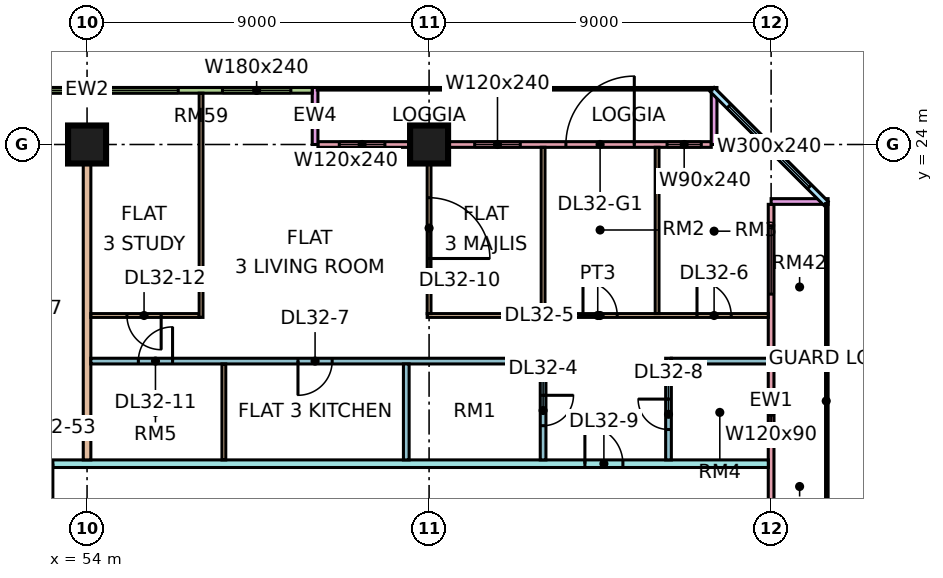
"""IFC4 building model, lengths in metres.
Left out: names, types, materials, properties, quantities, classifications, styles, units other than length and angle.
Written with IfcOpenShell. Run it as: python <this file> out.ifc"""

import sys

from ifc_helpers import new_model, si_unit, direction, frame, frame_2d, origin, origin_2d, place, context, subcontext, project, spatial, rectangle, extrude, element, fill, save


model = new_model("IFC4")
c1 = context("Model", 3, precision=1e-05, world=origin(), true_north=direction((0.0, 1.0)))
c2 = subcontext(c1, "Body", "Model", "MODEL_VIEW")
j1 = project(units=[si_unit("LENGTHUNIT", "METRE"), si_unit("PLANEANGLEUNIT", "RADIAN")], contexts=[c1])
p1 = place(None, origin())
s1 = spatial("IfcSite", under=j1, at=p1, CompositionType="ELEMENT")
p2 = place(p1, origin())
s2 = spatial("IfcBuilding", under=s1, at=p2, CompositionType="ELEMENT")
p3 = place(p2, frame((0.0, 0.0, 136.9)))
s3 = spatial("IfcBuildingStorey", under=s2, at=p3, CompositionType="ELEMENT", Elevation=136.9)
for number, where, z_axis, x_axis in (
    (1, (54.0, 24.0, 0.0), (0.0, 0.0, 1.0), (1.0, 0.0, 0.0)),
    (2, (63.0, 24.0, 0.0), (0.0, 0.0, 1.0), (1.0, 0.0, 0.0)),
):
    element("IfcColumn", number, at=place(p3, frame(where, z_axis=z_axis, x_axis=x_axis)), inside=s3, PredefinedType="COLUMN", context=c2, shape_type="SweptSolid", body=[
        extrude(rectangle(XDim=1.0, YDim=1.0, at=origin_2d()), origin(), (0.0, 0.0, 1.0), 3.75),
    ])
p4 = place(p3, frame((70.425, 24.0, 0.0), z_axis=(0.0, 0.0, 1.0), x_axis=(-1.0, 0.0, 0.0)))
e3 = element("IfcWall", 3, at=p4, inside=s3, PredefinedType="SOLIDWALL", context=c2, shape_type="SweptSolid", body=[
    extrude(rectangle(XDim=10.35, YDim=0.15, at=frame_2d((5.175, 0.0))), origin(), (0.0, 0.0, 1.0), 3.3),
])
p5 = place(p4, frame((0.262, 0.0, 0.45)))
e4 = element("IfcOpeningElement", 4, at=p5, cuts=e3, PredefinedType="OPENING", context=c2, shape_type="SweptSolid", body=[
    extrude(rectangle(XDim=0.9, YDim=2.4, at=frame_2d((0.45, 1.2))), frame((0.0, 0.085, 0.0), z_axis=(0.0, -1.0, 0.0), x_axis=(1.0, 0.0, 0.0)), (0.0, 0.0, 1.0), 0.17),
])
p6 = place(p4, frame((2.025, 0.0, 0.0)))
e5 = element("IfcOpeningElement", 5, at=p6, cuts=e3, PredefinedType="OPENING", context=c2, shape_type="SweptSolid", body=[
    extrude(rectangle(XDim=1.8, YDim=2.4, at=frame_2d((0.9, 1.2))), frame((0.0, 0.085, 0.0), z_axis=(0.0, -1.0, 0.0), x_axis=(1.0, 0.0, 0.0)), (0.0, 0.0, 1.0), 0.17),
])
p7 = place(p4, frame((5.025, 0.0, 0.45)))
e6 = element("IfcOpeningElement", 6, at=p7, cuts=e3, PredefinedType="OPENING", context=c2, shape_type="SweptSolid", body=[
    extrude(rectangle(XDim=1.2, YDim=2.4, at=frame_2d((0.6, 1.2))), frame((0.0, 0.085, 0.0), z_axis=(0.0, -1.0, 0.0), x_axis=(1.0, 0.0, 0.0)), (0.0, 0.0, 1.0), 0.17),
])
p8 = place(p4, frame((8.587, 0.0, 0.45)))
e7 = element("IfcOpeningElement", 7, at=p8, cuts=e3, PredefinedType="OPENING", context=c2, shape_type="SweptSolid", body=[
    extrude(rectangle(XDim=1.2, YDim=2.4, at=frame_2d((0.6, 1.2))), frame((0.0, 0.085, 0.0), z_axis=(0.0, -1.0, 0.0), x_axis=(1.0, 0.0, 0.0)), (0.0, 0.0, 1.0), 0.17),
])
for number, where, z_axis, x_axis in (
    (8, (70.5, 25.5, 0.0), (0.0, 0.0, 1.0), (0.0, -1.0, 0.0)),
    (9, (60.0, 25.5, 0.0), (0.0, 0.0, 1.0), (0.0, -1.0, 0.0)),
):
    element("IfcWall", number, at=place(p3, frame(where, z_axis=z_axis, x_axis=x_axis)), inside=s3, PredefinedType="SOLIDWALL", context=c2, shape_type="SweptSolid", body=[
        extrude(rectangle(XDim=1.5, YDim=0.15, at=frame_2d((0.75, 0.0))), origin(), (0.0, 0.0, 1.0), 3.3),
    ])
p9 = place(p3, frame((59.925, 25.425, 0.0), z_axis=(0.0, 0.0, 1.0), x_axis=(-1.0, 0.0, 0.0)))
e10 = element("IfcWall", 10, at=p9, inside=s3, PredefinedType="SOLIDWALL", context=c2, shape_type="SweptSolid", body=[
    extrude(rectangle(XDim=11.85, YDim=0.15, at=frame_2d((5.925, 0.0))), origin(), (0.0, 0.0, 1.0), 3.3),
])
p10 = place(p9, frame((0.562, 0.0, 0.45)))
e11 = element("IfcOpeningElement", 11, at=p10, cuts=e10, PredefinedType="OPENING", context=c2, shape_type="SweptSolid", body=[
    extrude(rectangle(XDim=1.8, YDim=2.4, at=frame_2d((0.9, 1.2))), frame((0.0, 0.085, 0.0), z_axis=(0.0, -1.0, 0.0), x_axis=(1.0, 0.0, 0.0)), (0.0, 0.0, 1.0), 0.17),
])
p11 = place(p9, frame((3.525, 0.0, 0.45)))
e12 = element("IfcOpeningElement", 12, at=p11, cuts=e10, PredefinedType="OPENING", context=c2, shape_type="SweptSolid", body=[
    extrude(rectangle(XDim=1.8, YDim=2.4, at=frame_2d((0.9, 1.2))), frame((0.0, 0.085, 0.0), z_axis=(0.0, -1.0, 0.0), x_axis=(1.0, 0.0, 0.0)), (0.0, 0.0, 1.0), 0.17),
])
p12 = place(p9, frame((6.488, 0.0, 0.45)))
e13 = element("IfcOpeningElement", 13, at=p12, cuts=e10, PredefinedType="OPENING", context=c2, shape_type="SweptSolid", body=[
    extrude(rectangle(XDim=4.8, YDim=2.4, at=frame_2d((2.4, 1.2))), frame((0.0, 0.085, 0.0), z_axis=(0.0, -1.0, 0.0), x_axis=(1.0, 0.0, 0.0)), (0.0, 0.0, 1.0), 0.17),
])
p13 = place(p3, frame((72.0, 12.075, 0.0), z_axis=(0.0, 0.0, 1.0), x_axis=(0.0, 1.0, 0.0)))
e14 = element("IfcWall", 14, at=p13, inside=s3, PredefinedType="SOLIDWALL", context=c2, shape_type="SweptSolid", body=[
    extrude(rectangle(XDim=10.35, YDim=0.15, at=frame_2d((5.175, 0.0))), origin(), (0.0, 0.0, 1.0), 3.3),
])
p14 = place(p13, frame((4.275, 0.0, 1.7)))
e15 = element("IfcOpeningElement", 15, at=p14, cuts=e14, PredefinedType="OPENING", context=c2, shape_type="SweptSolid", body=[
    extrude(rectangle(XDim=1.2, YDim=0.9, at=frame_2d((0.6, 0.45))), frame((0.0, 0.085, 0.0), z_axis=(0.0, -1.0, 0.0), x_axis=(1.0, 0.0, 0.0)), (0.0, 0.0, 1.0), 0.17),
])
p15 = place(p13, frame((7.988, 0.0, 0.45)))
e16 = element("IfcOpeningElement", 16, at=p15, cuts=e14, PredefinedType="OPENING", context=c2, shape_type="SweptSolid", body=[
    extrude(rectangle(XDim=1.8, YDim=2.4, at=frame_2d((0.9, 1.2))), frame((0.0, 0.085, 0.0), z_axis=(0.0, -1.0, 0.0), x_axis=(1.0, 0.0, 0.0)), (0.0, 0.0, 1.0), 0.17),
])
p16 = place(p3, frame((73.5, 22.5, 0.0), z_axis=(0.0, 0.0, 1.0), x_axis=(-1.0, 0.0, 0.0)))
e17 = element("IfcWall", 17, at=p16, inside=s3, PredefinedType="SOLIDWALL", context=c2, shape_type="SweptSolid", body=[
    extrude(rectangle(XDim=1.5, YDim=0.15, at=frame_2d((0.75, 0.0))), origin(), (0.0, 0.0, 1.0), 3.3),
])
p17 = place(p3, frame((73.447, 22.447, 0.0), z_axis=(0.0, 0.0, 1.0), x_axis=(-0.707106781187, 0.707106781187, 0.0)))
e18 = element("IfcWall", 18, at=p17, inside=s3, PredefinedType="SOLIDWALL", context=c2, shape_type="SweptSolid", body=[
    extrude(rectangle(XDim=4.243, YDim=0.15, at=frame_2d((2.121, 0.0))), origin(), (0.0, 0.0, 1.0), 3.3),
])
p18 = place(p17, frame((0.621, 0.0, 0.45)))
e19 = element("IfcOpeningElement", 19, at=p18, cuts=e18, PredefinedType="OPENING", context=c2, shape_type="SweptSolid", body=[
    extrude(rectangle(XDim=3.0, YDim=2.4, at=frame_2d((1.5, 1.2))), frame((0.0, 0.085, 0.0), z_axis=(0.0, -1.0, 0.0), x_axis=(1.0, 0.0, 0.0)), (0.0, 0.0, 1.0), 0.17),
])
p19 = place(p3, frame((51.225, 15.6, 0.0), z_axis=(0.0, 0.0, 1.0), x_axis=(1.0, 0.0, 0.0)))
e20 = element("IfcWall", 20, at=p19, inside=s3, PredefinedType="PARTITIONING", context=c2, shape_type="SweptSolid", body=[
    extrude(rectangle(XDim=20.701, YDim=0.2, at=frame_2d((10.351, 0.0))), origin(), (0.0, 0.0, 1.0), 3.3),
])
p20 = place(p19, frame((15.875, 0.0, 0.0)))
e21 = element("IfcOpeningElement", 21, at=p20, cuts=e20, PredefinedType="OPENING", context=c2, shape_type="SweptSolid", body=[
    extrude(rectangle(XDim=1.0, YDim=2.1, at=frame_2d((0.5, 1.05))), frame((0.0, 0.11, 0.0), z_axis=(0.0, -1.0, 0.0), x_axis=(1.0, 0.0, 0.0)), (0.0, 0.0, 1.0), 0.22),
])
p21 = place(p19, frame((0.875, 0.0, 0.0)))
e22 = element("IfcOpeningElement", 22, at=p21, cuts=e20, PredefinedType="OPENING", context=c2, shape_type="SweptSolid", body=[
    extrude(rectangle(XDim=1.0, YDim=2.1, at=frame_2d((0.5, 1.05))), frame((0.0, 0.11, 0.0), z_axis=(0.0, -1.0, 0.0), x_axis=(1.0, 0.0, 0.0)), (0.0, 0.0, 1.0), 0.22),
])
p22 = place(p3, frame((54.0, 15.7, 0.0), z_axis=(0.0, 0.0, 1.0), x_axis=(0.0, 1.0, 0.0)))
e23 = element("IfcWall", 23, at=p22, inside=s3, PredefinedType="PARTITIONING", context=c2, shape_type="SweptSolid", body=[
    extrude(rectangle(XDim=8.3, YDim=0.2, at=frame_2d((4.15, 0.0))), origin(), (0.0, 0.0, 1.0), 3.3),
])
p23 = place(p3, frame((54.1, 18.3, 0.0), z_axis=(0.0, 0.0, 1.0), x_axis=(1.0, 0.0, 0.0)))
e24 = element("IfcWall", 24, at=p23, inside=s3, PredefinedType="PARTITIONING", context=c2, shape_type="SweptSolid", body=[
    extrude(rectangle(XDim=11.975, YDim=0.15, at=frame_2d((5.987, 0.0))), origin(), (0.0, 0.0, 1.0), 3.3),
])
p24 = place(p23, frame((5.45, 0.0, 0.0)))
e25 = element("IfcOpeningElement", 25, at=p24, cuts=e24, PredefinedType="OPENING", context=c2, shape_type="SweptSolid", body=[
    extrude(rectangle(XDim=0.9, YDim=2.1, at=frame_2d((0.45, 1.05))), frame((0.0, 0.085, 0.0), z_axis=(0.0, -1.0, 0.0), x_axis=(1.0, 0.0, 0.0)), (0.0, 0.0, 1.0), 0.17),
])
p25 = place(p23, frame((1.25, 0.0, 0.0)))
e26 = element("IfcOpeningElement", 26, at=p25, cuts=e24, PredefinedType="OPENING", context=c2, shape_type="SweptSolid", body=[
    extrude(rectangle(XDim=0.9, YDim=2.1, at=frame_2d((0.45, 1.05))), frame((0.0, 0.085, 0.0), z_axis=(0.0, -1.0, 0.0), x_axis=(1.0, 0.0, 0.0)), (0.0, 0.0, 1.0), 0.17),
])
p26 = place(p3, frame((54.1, 19.5, 0.0), z_axis=(0.0, 0.0, 1.0), x_axis=(1.0, 0.0, 0.0)))
e27 = element("IfcWall", 27, at=p26, inside=s3, PredefinedType="PARTITIONING", context=c2, shape_type="SweptSolid", body=[
    extrude(rectangle(XDim=2.85, YDim=0.1, at=frame_2d((1.425, 0.0))), origin(), (0.0, 0.0, 1.0), 3.3),
])
p27 = place(p26, frame((0.95, 0.0, 0.0)))
e28 = element("IfcOpeningElement", 28, at=p27, cuts=e27, PredefinedType="OPENING", context=c2, shape_type="SweptSolid", body=[
    extrude(rectangle(XDim=0.9, YDim=2.1, at=frame_2d((0.45, 1.05))), frame((0.0, 0.06, 0.0), z_axis=(0.0, -1.0, 0.0), x_axis=(1.0, 0.0, 0.0)), (0.0, 0.0, 1.0), 0.12),
])
p28 = place(p3, frame((57.0, 19.45, 0.0), z_axis=(0.0, 0.0, 1.0), x_axis=(0.0, 1.0, 0.0)))
e29 = element("IfcWall", 29, at=p28, inside=s3, PredefinedType="PARTITIONING", context=c2, shape_type="SweptSolid", body=[
    extrude(rectangle(XDim=5.9, YDim=0.1, at=frame_2d((2.95, 0.0))), origin(), (0.0, 0.0, 1.0), 3.3),
])
p29 = place(p3, frame((57.6, 15.7, 0.0), z_axis=(0.0, 0.0, 1.0), x_axis=(0.0, 1.0, 0.0)))
e30 = element("IfcWall", 30, at=p29, inside=s3, PredefinedType="PARTITIONING", context=c2, shape_type="SweptSolid", body=[
    extrude(rectangle(XDim=2.525, YDim=0.1, at=frame_2d((1.263, 0.0))), origin(), (0.0, 0.0, 1.0), 3.3),
])
p30 = place(p3, frame((62.4, 15.7, 0.0), z_axis=(0.0, 0.0, 1.0), x_axis=(0.0, 1.0, 0.0)))
e31 = element("IfcWall", 31, at=p30, inside=s3, PredefinedType="PARTITIONING", context=c2, shape_type="SweptSolid", body=[
    extrude(rectangle(XDim=2.525, YDim=0.15, at=frame_2d((1.263, 0.0))), origin(), (0.0, 0.0, 1.0), 3.3),
])
p31 = place(p3, frame((62.95, 19.5, 0.0), z_axis=(0.0, 0.0, 1.0), x_axis=(1.0, 0.0, 0.0)))
e32 = element("IfcWall", 32, at=p31, inside=s3, PredefinedType="PARTITIONING", context=c2, shape_type="SweptSolid", body=[
    extrude(rectangle(XDim=8.976, YDim=0.1, at=frame_2d((4.488, 0.0))), origin(), (0.0, 0.0, 1.0), 3.3),
])
p32 = place(p31, frame((4.1, 0.0, 0.0)))
e33 = element("IfcOpeningElement", 33, at=p32, cuts=e32, PredefinedType="OPENING", context=c2, shape_type="SweptSolid", body=[
    extrude(rectangle(XDim=0.9, YDim=2.1, at=frame_2d((0.45, 1.05))), frame((0.0, 0.06, 0.0), z_axis=(0.0, -1.0, 0.0), x_axis=(1.0, 0.0, 0.0)), (0.0, 0.0, 1.0), 0.12),
])
p33 = place(p31, frame((7.1, 0.0, 0.0)))
e34 = element("IfcOpeningElement", 34, at=p33, cuts=e32, PredefinedType="OPENING", context=c2, shape_type="SweptSolid", body=[
    extrude(rectangle(XDim=0.9, YDim=2.1, at=frame_2d((0.45, 1.05))), frame((0.0, 0.06, 0.0), z_axis=(0.0, -1.0, 0.0), x_axis=(1.0, 0.0, 0.0)), (0.0, 0.0, 1.0), 0.12),
])
p34 = place(p3, frame((63.0, 19.55, 0.0), z_axis=(0.0, 0.0, 1.0), x_axis=(0.0, 1.0, 0.0)))
e35 = element("IfcWall", 35, at=p34, inside=s3, PredefinedType="PARTITIONING", context=c2, shape_type="SweptSolid", body=[
    extrude(rectangle(XDim=4.376, YDim=0.1, at=frame_2d((2.188, 0.0))), origin(), (0.0, 0.0, 1.0), 3.3),
])
p35 = place(p34, frame((1.45, 0.0, 0.0)))
e36 = element("IfcOpeningElement", 36, at=p35, cuts=e35, PredefinedType="OPENING", context=c2, shape_type="SweptSolid", body=[
    extrude(rectangle(XDim=1.6, YDim=2.1, at=frame_2d((0.8, 1.05))), frame((0.0, 0.06, 0.0), z_axis=(0.0, -1.0, 0.0), x_axis=(1.0, 0.0, 0.0)), (0.0, 0.0, 1.0), 0.12),
])
p36 = place(p3, frame((66.0, 15.7, 0.0), z_axis=(0.0, 0.0, 1.0), x_axis=(0.0, 1.0, 0.0)))
e37 = element("IfcWall", 37, at=p36, inside=s3, PredefinedType="PARTITIONING", context=c2, shape_type="SweptSolid", body=[
    extrude(rectangle(XDim=2.525, YDim=0.15, at=frame_2d((1.263, 0.0))), origin(), (0.0, 0.0, 1.0), 3.3),
])
p37 = place(p36, frame((0.9, 0.0, 0.0)))
e38 = element("IfcOpeningElement", 38, at=p37, cuts=e37, PredefinedType="OPENING", context=c2, shape_type="SweptSolid", body=[
    extrude(rectangle(XDim=0.8, YDim=2.1, at=frame_2d((0.4, 1.05))), frame((0.0, 0.085, 0.0), z_axis=(0.0, -1.0, 0.0), x_axis=(1.0, 0.0, 0.0)), (0.0, 0.0, 1.0), 0.17),
])
for number, where, z_axis, x_axis in (
    (39, (66.0, 19.55, 0.0), (0.0, 0.0, 1.0), (0.0, 1.0, 0.0)),
    (40, (69.0, 19.55, 0.0), (0.0, 0.0, 1.0), (0.0, 1.0, 0.0)),
):
    element("IfcWall", number, at=place(p3, frame(where, z_axis=z_axis, x_axis=x_axis)), inside=s3, PredefinedType="PARTITIONING", context=c2, shape_type="SweptSolid", body=[
        extrude(rectangle(XDim=4.376, YDim=0.1, at=frame_2d((2.188, 0.0))), origin(), (0.0, 0.0, 1.0), 3.3),
    ])
p38 = place(p3, frame((69.3, 15.7, 0.0), z_axis=(0.0, 0.0, 1.0), x_axis=(0.0, 1.0, 0.0)))
e41 = element("IfcWall", 41, at=p38, inside=s3, PredefinedType="PARTITIONING", context=c2, shape_type="SweptSolid", body=[
    extrude(rectangle(XDim=2.675, YDim=0.15, at=frame_2d((1.337, 0.0))), origin(), (0.0, 0.0, 1.0), 3.3),
])
p39 = place(p38, frame((0.8, 0.0, 0.0)))
e42 = element("IfcOpeningElement", 42, at=p39, cuts=e41, PredefinedType="OPENING", context=c2, shape_type="SweptSolid", body=[
    extrude(rectangle(XDim=0.8, YDim=2.1, at=frame_2d((0.4, 1.05))), frame((0.0, 0.085, 0.0), z_axis=(0.0, -1.0, 0.0), x_axis=(1.0, 0.0, 0.0)), (0.0, 0.0, 1.0), 0.17),
])
p40 = place(p3, frame((69.375, 18.3, 0.0), z_axis=(0.0, 0.0, 1.0), x_axis=(1.0, 0.0, 0.0)))
e43 = element("IfcWall", 43, at=p40, inside=s3, PredefinedType="PARTITIONING", context=c2, shape_type="SweptSolid", body=[
    extrude(rectangle(XDim=2.551, YDim=0.15, at=frame_2d((1.275, 0.0))), origin(), (0.0, 0.0, 1.0), 3.3),
])
p41 = place(p5, origin())
e44 = element("IfcWindow", 44, at=p41, inside=s3, PartitioningType="SINGLE_PANEL", PredefinedType="WINDOW", context=c2, shape_type="SweptSolid", body=[
    extrude(rectangle(XDim=0.9, YDim=2.4, at=frame_2d((0.45, 1.2))), frame((0.0, 0.03, 0.0), z_axis=(0.0, -1.0, 0.0), x_axis=(1.0, 0.0, 0.0)), (0.0, 0.0, 1.0), 0.06),
])
fill(e4, e44)
p42 = place(p6, frame((1.8, 0.0, 0.0), z_axis=(0.0, 0.0, 1.0), x_axis=(-1.0, 0.0, 0.0)))
e45 = element("IfcDoor", 45, at=p42, inside=s3, OperationType="DOUBLE_DOOR_SINGLE_SWING", PredefinedType="DOOR", context=c2, shape_type="SweptSolid", body=[
    extrude(rectangle(XDim=1.8, YDim=2.4, at=frame_2d((0.9, 1.2))), frame((0.0, 0.025, 0.0), z_axis=(0.0, -1.0, 0.0), x_axis=(1.0, 0.0, 0.0)), (0.0, 0.0, 1.0), 0.05),
])
fill(e5, e45)
p43 = place(p7, origin())
e46 = element("IfcWindow", 46, at=p43, inside=s3, PartitioningType="SINGLE_PANEL", PredefinedType="WINDOW", context=c2, shape_type="SweptSolid", body=[
    extrude(rectangle(XDim=1.2, YDim=2.4, at=frame_2d((0.6, 1.2))), frame((0.0, 0.03, 0.0), z_axis=(0.0, -1.0, 0.0), x_axis=(1.0, 0.0, 0.0)), (0.0, 0.0, 1.0), 0.06),
])
fill(e6, e46)
p44 = place(p8, origin())
e47 = element("IfcWindow", 47, at=p44, inside=s3, PartitioningType="SINGLE_PANEL", PredefinedType="WINDOW", context=c2, shape_type="SweptSolid", body=[
    extrude(rectangle(XDim=1.2, YDim=2.4, at=frame_2d((0.6, 1.2))), frame((0.0, 0.03, 0.0), z_axis=(0.0, -1.0, 0.0), x_axis=(1.0, 0.0, 0.0)), (0.0, 0.0, 1.0), 0.06),
])
fill(e7, e47)
p45 = place(p10, origin())
e48 = element("IfcWindow", 48, at=p45, inside=s3, PartitioningType="SINGLE_PANEL", PredefinedType="WINDOW", context=c2, shape_type="SweptSolid", body=[
    extrude(rectangle(XDim=1.8, YDim=2.4, at=frame_2d((0.9, 1.2))), frame((0.0, 0.03, 0.0), z_axis=(0.0, -1.0, 0.0), x_axis=(1.0, 0.0, 0.0)), (0.0, 0.0, 1.0), 0.06),
])
fill(e11, e48)
p46 = place(p11, origin())
e49 = element("IfcWindow", 49, at=p46, inside=s3, PartitioningType="SINGLE_PANEL", PredefinedType="WINDOW", context=c2, shape_type="SweptSolid", body=[
    extrude(rectangle(XDim=1.8, YDim=2.4, at=frame_2d((0.9, 1.2))), frame((0.0, 0.03, 0.0), z_axis=(0.0, -1.0, 0.0), x_axis=(1.0, 0.0, 0.0)), (0.0, 0.0, 1.0), 0.06),
])
fill(e12, e49)
p47 = place(p12, origin())
e50 = element("IfcWindow", 50, at=p47, inside=s3, PartitioningType="SINGLE_PANEL", PredefinedType="WINDOW", context=c2, shape_type="SweptSolid", body=[
    extrude(rectangle(XDim=4.8, YDim=2.4, at=frame_2d((2.4, 1.2))), frame((0.0, 0.03, 0.0), z_axis=(0.0, -1.0, 0.0), x_axis=(1.0, 0.0, 0.0)), (0.0, 0.0, 1.0), 0.06),
])
fill(e13, e50)
p48 = place(p14, origin())
e51 = element("IfcWindow", 51, at=p48, inside=s3, PartitioningType="SINGLE_PANEL", PredefinedType="WINDOW", context=c2, shape_type="SweptSolid", body=[
    extrude(rectangle(XDim=1.2, YDim=0.9, at=frame_2d((0.6, 0.45))), frame((0.0, 0.03, 0.0), z_axis=(0.0, -1.0, 0.0), x_axis=(1.0, 0.0, 0.0)), (0.0, 0.0, 1.0), 0.06),
])
fill(e15, e51)
p49 = place(p15, origin())
e52 = element("IfcWindow", 52, at=p49, inside=s3, PartitioningType="SINGLE_PANEL", PredefinedType="WINDOW", context=c2, shape_type="SweptSolid", body=[
    extrude(rectangle(XDim=1.8, YDim=2.4, at=frame_2d((0.9, 1.2))), frame((0.0, 0.03, 0.0), z_axis=(0.0, -1.0, 0.0), x_axis=(1.0, 0.0, 0.0)), (0.0, 0.0, 1.0), 0.06),
])
fill(e16, e52)
p50 = place(p18, origin())
e53 = element("IfcWindow", 53, at=p50, inside=s3, PartitioningType="SINGLE_PANEL", PredefinedType="WINDOW", context=c2, shape_type="SweptSolid", body=[
    extrude(rectangle(XDim=3.0, YDim=2.4, at=frame_2d((1.5, 1.2))), frame((0.0, 0.03, 0.0), z_axis=(0.0, -1.0, 0.0), x_axis=(1.0, 0.0, 0.0)), (0.0, 0.0, 1.0), 0.06),
])
fill(e19, e53)
p51 = place(p37, origin())
e54 = element("IfcDoor", 54, at=p51, inside=s3, OperationType="SINGLE_SWING_RIGHT", PredefinedType="DOOR", context=c2, shape_type="SweptSolid", body=[
    extrude(rectangle(XDim=0.8, YDim=2.1, at=frame_2d((0.4, 1.05))), frame((0.0, 0.025, 0.0), z_axis=(0.0, -1.0, 0.0), x_axis=(1.0, 0.0, 0.0)), (0.0, 0.0, 1.0), 0.05),
])
fill(e38, e54)
p52 = place(p32, origin())
e55 = element("IfcDoor", 55, at=p52, inside=s3, OperationType="SINGLE_SWING_LEFT", PredefinedType="DOOR", context=c2, shape_type="SweptSolid", body=[
    extrude(rectangle(XDim=0.9, YDim=2.1, at=frame_2d((0.45, 1.05))), frame((0.0, 0.025, 0.0), z_axis=(0.0, -1.0, 0.0), x_axis=(1.0, 0.0, 0.0)), (0.0, 0.0, 1.0), 0.05),
])
fill(e33, e55)
p53 = place(p33, origin())
e56 = element("IfcDoor", 56, at=p53, inside=s3, OperationType="SINGLE_SWING_LEFT", PredefinedType="DOOR", context=c2, shape_type="SweptSolid", body=[
    extrude(rectangle(XDim=0.9, YDim=2.1, at=frame_2d((0.45, 1.05))), frame((0.0, 0.025, 0.0), z_axis=(0.0, -1.0, 0.0), x_axis=(1.0, 0.0, 0.0)), (0.0, 0.0, 1.0), 0.05),
])
fill(e34, e56)
p54 = place(p24, frame((0.9, 0.0, 0.0), z_axis=(0.0, 0.0, 1.0), x_axis=(-1.0, 0.0, 0.0)))
e57 = element("IfcDoor", 57, at=p54, inside=s3, OperationType="SINGLE_SWING_LEFT", PredefinedType="DOOR", context=c2, shape_type="SweptSolid", body=[
    extrude(rectangle(XDim=0.9, YDim=2.1, at=frame_2d((0.45, 1.05))), frame((0.0, 0.025, 0.0), z_axis=(0.0, -1.0, 0.0), x_axis=(1.0, 0.0, 0.0)), (0.0, 0.0, 1.0), 0.05),
])
fill(e25, e57)
p55 = place(p39, frame((0.8, 0.0, 0.0), z_axis=(0.0, 0.0, 1.0), x_axis=(-1.0, 0.0, 0.0)))
e58 = element("IfcDoor", 58, at=p55, inside=s3, OperationType="SINGLE_SWING_RIGHT", PredefinedType="DOOR", context=c2, shape_type="SweptSolid", body=[
    extrude(rectangle(XDim=0.8, YDim=2.1, at=frame_2d((0.4, 1.05))), frame((0.0, 0.025, 0.0), z_axis=(0.0, -1.0, 0.0), x_axis=(1.0, 0.0, 0.0)), (0.0, 0.0, 1.0), 0.05),
])
fill(e42, e58)
p56 = place(p20, origin())
e59 = element("IfcDoor", 59, at=p56, inside=s3, OperationType="SINGLE_SWING_LEFT", PredefinedType="DOOR", context=c2, shape_type="SweptSolid", body=[
    extrude(rectangle(XDim=1.0, YDim=2.1, at=frame_2d((0.5, 1.05))), frame((0.0, 0.025, 0.0), z_axis=(0.0, -1.0, 0.0), x_axis=(1.0, 0.0, 0.0)), (0.0, 0.0, 1.0), 0.05),
])
fill(e21, e59)
p57 = place(p35, frame((1.6, 0.0, 0.0), z_axis=(0.0, 0.0, 1.0), x_axis=(-1.0, 0.0, 0.0)))
e60 = element("IfcDoor", 60, at=p57, inside=s3, OperationType="DOUBLE_DOOR_SINGLE_SWING", PredefinedType="DOOR", context=c2, shape_type="SweptSolid", body=[
    extrude(rectangle(XDim=1.6, YDim=2.1, at=frame_2d((0.8, 1.05))), frame((0.0, 0.025, 0.0), z_axis=(0.0, -1.0, 0.0), x_axis=(1.0, 0.0, 0.0)), (0.0, 0.0, 1.0), 0.05),
])
fill(e36, e60)
p58 = place(p25, frame((0.9, 0.0, 0.0), z_axis=(0.0, 0.0, 1.0), x_axis=(-1.0, 0.0, 0.0)))
e61 = element("IfcDoor", 61, at=p58, inside=s3, OperationType="SINGLE_SWING_RIGHT", PredefinedType="DOOR", context=c2, shape_type="SweptSolid", body=[
    extrude(rectangle(XDim=0.9, YDim=2.1, at=frame_2d((0.45, 1.05))), frame((0.0, 0.025, 0.0), z_axis=(0.0, -1.0, 0.0), x_axis=(1.0, 0.0, 0.0)), (0.0, 0.0, 1.0), 0.05),
])
fill(e26, e61)
p59 = place(p27, origin())
e62 = element("IfcDoor", 62, at=p59, inside=s3, OperationType="SINGLE_SWING_RIGHT", PredefinedType="DOOR", context=c2, shape_type="SweptSolid", body=[
    extrude(rectangle(XDim=0.9, YDim=2.1, at=frame_2d((0.45, 1.05))), frame((0.0, 0.025, 0.0), z_axis=(0.0, -1.0, 0.0), x_axis=(1.0, 0.0, 0.0)), (0.0, 0.0, 1.0), 0.05),
])
fill(e28, e62)
p60 = place(p21, origin())
e63 = element("IfcDoor", 63, at=p60, inside=s3, OperationType="SINGLE_SWING_RIGHT", PredefinedType="DOOR", context=c2, shape_type="SweptSolid", body=[
    extrude(rectangle(XDim=1.0, YDim=2.1, at=frame_2d((0.5, 1.05))), frame((0.0, 0.025, 0.0), z_axis=(0.0, -1.0, 0.0), x_axis=(1.0, 0.0, 0.0)), (0.0, 0.0, 1.0), 0.05),
])
fill(e22, e63)
save(model, sys.argv[1])
